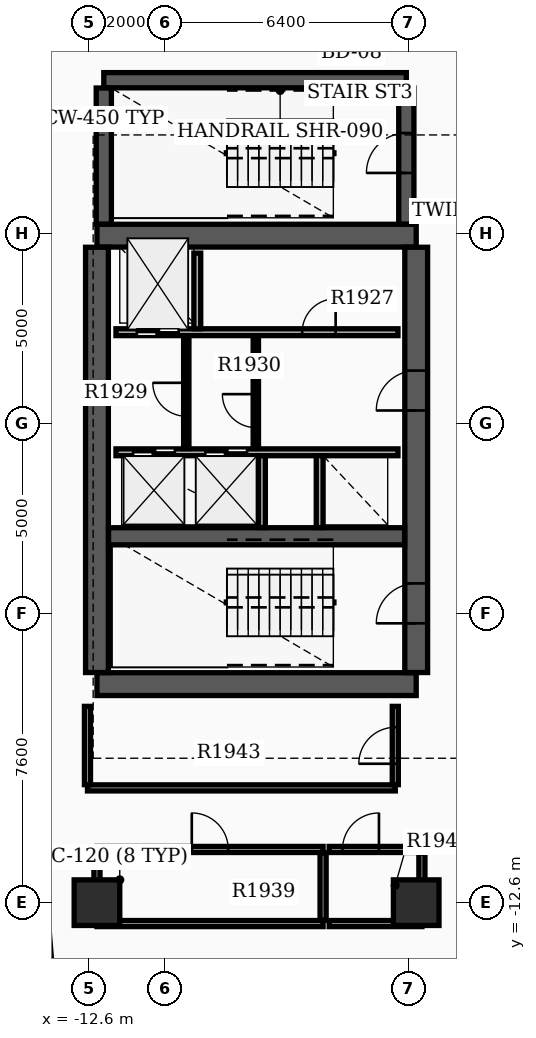
"""IFC4 building model, lengths in metres.
Left out: names, types, materials, properties, quantities, classifications, styles, units other than length and angle.
Written with IfcOpenShell. Run it as: python <this file> out.ifc"""

import sys

from ifc_helpers import new_model, si_unit, direction, frame, frame_2d, origin, origin_2d, place, context, subcontext, project, spatial, rectangle, extrude, element, fill, save


model = new_model("IFC4")
c1 = context("Model", 3, precision=1e-05, world=origin(), true_north=direction((0.0, 1.0)))
c2 = subcontext(c1, "Body", "Model", "MODEL_VIEW")
j1 = project(units=[si_unit("LENGTHUNIT", "METRE"), si_unit("PLANEANGLEUNIT", "RADIAN")], contexts=[c1])
p1 = place(None, origin())
s1 = spatial("IfcSite", under=j1, at=p1, CompositionType="ELEMENT")
p2 = place(p1, origin())
s2 = spatial("IfcBuilding", under=s1, at=p2, CompositionType="ELEMENT")
p3 = place(p2, frame((0.0, 0.0, 124.2)))
s3 = spatial("IfcBuildingStorey", under=s2, at=p3, CompositionType="ELEMENT", Elevation=124.2)
for number, where, z_axis, x_axis in (
    (1, (-12.4, -6.85, 0.0), (0.0, 0.0, 1.0), (1.0, 0.0, 0.0)),
    (2, (-12.4, 4.95, 0.0), (0.0, 0.0, 1.0), (1.0, 0.0, 0.0)),
):
    element("IfcWall", number, at=place(p3, frame(where, z_axis=z_axis, x_axis=x_axis)), inside=s3, PredefinedType="SHEAR", context=c2, shape_type="SweptSolid", body=[
        extrude(rectangle(XDim=8.4, YDim=0.6, at=frame_2d((4.2, 0.0))), origin(), (0.0, 0.0, 1.0), 3.7),
    ])
p4 = place(p3, frame((-12.4, -6.545, 0.0), z_axis=(0.0, 0.0, 1.0), x_axis=(0.0, 1.0, 0.0)))
e3 = element("IfcWall", 3, at=p4, inside=s3, PredefinedType="SHEAR", context=c2, shape_type="SweptSolid", body=[
    extrude(rectangle(XDim=11.19, YDim=0.6, at=frame_2d((5.595, 0.0))), origin(), (0.0, 0.0, 1.0), 3.7),
])
p5 = place(p3, frame((-4.0, -6.545, 0.0), z_axis=(0.0, 0.0, 1.0), x_axis=(0.0, 1.0, 0.0)))
e4 = element("IfcWall", 4, at=p5, inside=s3, PredefinedType="SHEAR", context=c2, shape_type="SweptSolid", body=[
    extrude(rectangle(XDim=11.19, YDim=0.6, at=frame_2d((5.595, 0.0))), origin(), (0.0, 0.0, 1.0), 3.7),
])
p6 = place(p5, frame((1.295, 0.0, 0.0)))
e5 = element("IfcOpeningElement", 5, at=p6, cuts=e4, PredefinedType="OPENING", context=c2, shape_type="SweptSolid", body=[
    extrude(rectangle(XDim=1.05, YDim=2.15, at=frame_2d((0.525, 1.075))), frame((0.0, 0.31, 0.0), z_axis=(0.0, -1.0, 0.0), x_axis=(1.0, 0.0, 0.0)), (0.0, 0.0, 1.0), 0.62),
])
p7 = place(p5, frame((6.895, 0.0, 0.0)))
e6 = element("IfcOpeningElement", 6, at=p7, cuts=e4, PredefinedType="OPENING", context=c2, shape_type="SweptSolid", body=[
    extrude(rectangle(XDim=1.05, YDim=2.15, at=frame_2d((0.525, 1.075))), frame((0.0, 0.31, 0.0), z_axis=(0.0, -1.0, 0.0), x_axis=(1.0, 0.0, 0.0)), (0.0, 0.0, 1.0), 0.62),
])
p8 = place(p3, frame((-12.095, -2.96, 0.0), z_axis=(0.0, 0.0, 1.0), x_axis=(1.0, 0.0, 0.0)))
e7 = element("IfcWall", 7, at=p8, inside=s3, PredefinedType="SHEAR", context=c2, shape_type="SweptSolid", body=[
    extrude(rectangle(XDim=7.79, YDim=0.45, at=frame_2d((3.895, 0.0))), origin(), (0.0, 0.0, 1.0), 3.7),
])
p9 = place(p3, frame((-12.22, 9.04, 0.0), z_axis=(0.0, 0.0, 1.0), x_axis=(1.0, 0.0, 0.0)))
e8 = element("IfcWall", 8, at=p9, inside=s3, PredefinedType="SHEAR", context=c2, shape_type="SweptSolid", body=[
    extrude(rectangle(XDim=7.96, YDim=0.4, at=frame_2d((3.98, 0.0))), origin(), (0.0, 0.0, 1.0), 3.7),
])
p10 = place(p3, frame((-12.22, 5.255, 0.0), z_axis=(0.0, 0.0, 1.0), x_axis=(0.0, 1.0, 0.0)))
e9 = element("IfcWall", 9, at=p10, inside=s3, PredefinedType="SHEAR", context=c2, shape_type="SweptSolid", body=[
    extrude(rectangle(XDim=3.58, YDim=0.4, at=frame_2d((1.79, 0.0))), origin(), (0.0, 0.0, 1.0), 3.7),
])
p11 = place(p3, frame((-4.26, 5.255, 0.0), z_axis=(0.0, 0.0, 1.0), x_axis=(0.0, 1.0, 0.0)))
e10 = element("IfcWall", 10, at=p11, inside=s3, PredefinedType="SHEAR", context=c2, shape_type="SweptSolid", body=[
    extrude(rectangle(XDim=3.58, YDim=0.4, at=frame_2d((1.79, 0.0))), origin(), (0.0, 0.0, 1.0), 3.7),
])
p12 = place(p11, frame((1.345, 0.0, 0.0)))
e11 = element("IfcOpeningElement", 11, at=p12, cuts=e10, PredefinedType="OPENING", context=c2, shape_type="SweptSolid", body=[
    extrude(rectangle(XDim=1.05, YDim=2.15, at=frame_2d((0.525, 1.075))), frame((0.0, 0.21, 0.0), z_axis=(0.0, -1.0, 0.0), x_axis=(1.0, 0.0, 0.0)), (0.0, 0.0, 1.0), 0.42),
])
for number, where, z_axis, x_axis in (
    (12, (-12.4, -12.6, 0.0), (0.0, 0.0, 1.0), (1.0, 0.0, 0.0)),
    (13, (-4.0, -12.6, 0.0), (0.0, 0.0, 1.0), (1.0, 0.0, 0.0)),
):
    element("IfcColumn", number, at=place(p3, frame(where, z_axis=z_axis, x_axis=x_axis)), inside=s3, PredefinedType="COLUMN", context=c2, shape_type="SweptSolid", body=[
        extrude(rectangle(XDim=1.2, YDim=1.2, at=origin_2d()), origin(), (0.0, 0.0, 1.0), 3.9),
    ])
p13 = place(p3, frame((-14.238, -7.721, 0.0), z_axis=(0.0, 0.0, 1.0), x_axis=(0.078438149236, -0.996918982036, 0.0)))
e14 = element("IfcWall", 14, at=p13, inside=s3, PredefinedType="STANDARD", context=c2, shape_type="SweptSolid", body=[
    extrude(rectangle(XDim=6.86, YDim=0.28, at=frame_2d((3.43, 0.0))), origin(), (0.0, 0.0, 1.0), 2.97),
])
p14 = place(p3, frame((-11.9, 2.41, 0.0), z_axis=(0.0, 0.0, 1.0), x_axis=(1.0, 0.0, 0.0)))
e15 = element("IfcWall", 15, at=p14, inside=s3, PredefinedType="SOLIDWALL", context=c2, shape_type="SweptSolid", body=[
    extrude(rectangle(XDim=7.42, YDim=0.18, at=frame_2d((3.71, 0.0))), origin(), (0.0, 0.0, 1.0), 2.96),
])
p15 = place(p14, frame((0.55, 0.0, 0.0)))
e16 = element("IfcOpeningElement", 16, at=p15, cuts=e15, PredefinedType="OPENING", context=c2, shape_type="SweptSolid", body=[
    extrude(rectangle(XDim=1.1, YDim=2.15, at=frame_2d((0.55, 1.075))), frame((0.0, 0.1, 0.0), z_axis=(0.0, -1.0, 0.0), x_axis=(1.0, 0.0, 0.0)), (0.0, 0.0, 1.0), 0.2),
])
p16 = place(p14, frame((4.9, 0.0, 0.0)))
e17 = element("IfcOpeningElement", 17, at=p16, cuts=e15, PredefinedType="OPENING", context=c2, shape_type="SweptSolid", body=[
    extrude(rectangle(XDim=0.88, YDim=2.1, at=frame_2d((0.44, 1.05))), frame((0.0, 0.1, 0.0), z_axis=(0.0, -1.0, 0.0), x_axis=(1.0, 0.0, 0.0)), (0.0, 0.0, 1.0), 0.2),
])
p17 = place(p3, frame((-11.9, -0.75, 0.0), z_axis=(0.0, 0.0, 1.0), x_axis=(1.0, 0.0, 0.0)))
e18 = element("IfcWall", 18, at=p17, inside=s3, PredefinedType="SOLIDWALL", context=c2, shape_type="SweptSolid", body=[
    extrude(rectangle(XDim=7.42, YDim=0.18, at=frame_2d((3.71, 0.0))), origin(), (0.0, 0.0, 1.0), 2.96),
])
p18 = place(p17, frame((0.45, 0.0, 0.0)))
e19 = element("IfcOpeningElement", 19, at=p18, cuts=e18, PredefinedType="OPENING", context=c2, shape_type="SweptSolid", body=[
    extrude(rectangle(XDim=1.1, YDim=2.15, at=frame_2d((0.55, 1.075))), frame((0.0, 0.1, 0.0), z_axis=(0.0, -1.0, 0.0), x_axis=(1.0, 0.0, 0.0)), (0.0, 0.0, 1.0), 0.2),
])
p19 = place(p17, frame((2.35, 0.0, 0.0)))
e20 = element("IfcOpeningElement", 20, at=p19, cuts=e18, PredefinedType="OPENING", context=c2, shape_type="SweptSolid", body=[
    extrude(rectangle(XDim=1.1, YDim=2.15, at=frame_2d((0.55, 1.075))), frame((0.0, 0.1, 0.0), z_axis=(0.0, -1.0, 0.0), x_axis=(1.0, 0.0, 0.0)), (0.0, 0.0, 1.0), 0.2),
])
p20 = place(p3, frame((-9.76, 2.5, 0.0), z_axis=(0.0, 0.0, 1.0), x_axis=(0.0, 1.0, 0.0)))
e21 = element("IfcWall", 21, at=p20, inside=s3, PredefinedType="SOLIDWALL", context=c2, shape_type="SweptSolid", body=[
    extrude(rectangle(XDim=1.99, YDim=0.18, at=frame_2d((0.995, 0.0))), origin(), (0.0, 0.0, 1.0), 2.96),
])
for number, where, z_axis, x_axis in (
    (22, (-8.06, -2.73, 0.0), (0.0, 0.0, 1.0), (0.0, 1.0, 0.0)),
    (23, (-6.54, -2.73, 0.0), (0.0, 0.0, 1.0), (0.0, 1.0, 0.0)),
):
    element("IfcWall", number, at=place(p3, frame(where, z_axis=z_axis, x_axis=x_axis)), inside=s3, PredefinedType="SOLIDWALL", context=c2, shape_type="SweptSolid", body=[
        extrude(rectangle(XDim=1.89, YDim=0.18, at=frame_2d((0.945, 0.0))), origin(), (0.0, 0.0, 1.0), 2.96),
    ])
p21 = place(p3, frame((-8.22, -0.65, 0.0), z_axis=(0.0, 0.0, 1.0), x_axis=(0.0, 1.0, 0.0)))
e24 = element("IfcWall", 24, at=p21, inside=s3, PredefinedType="SOLIDWALL", context=c2, shape_type="SweptSolid", body=[
    extrude(rectangle(XDim=2.96, YDim=0.14, at=frame_2d((1.48, 0.0))), origin(), (0.0, 0.0, 1.0), 2.96),
])
p22 = place(p21, frame((0.55, 0.0, 0.0)))
e25 = element("IfcOpeningElement", 25, at=p22, cuts=e24, PredefinedType="OPENING", context=c2, shape_type="SweptSolid", body=[
    extrude(rectangle(XDim=0.88, YDim=2.1, at=frame_2d((0.44, 1.05))), frame((0.0, 0.08, 0.0), z_axis=(0.0, -1.0, 0.0), x_axis=(1.0, 0.0, 0.0)), (0.0, 0.0, 1.0), 0.16),
])
p23 = place(p3, frame((-10.05, -0.652, 0.0), z_axis=(0.0, 0.0, 1.0), x_axis=(0.0, 1.0, 0.0)))
e26 = element("IfcWall", 26, at=p23, inside=s3, PredefinedType="PARTITIONING", context=c2, shape_type="SweptSolid", body=[
    extrude(rectangle(XDim=2.962, YDim=0.14, at=frame_2d((1.481, 0.0))), origin(), (0.0, 0.0, 1.0), 2.96),
])
p24 = place(p23, frame((0.85, 0.0, 0.0)))
e27 = element("IfcOpeningElement", 27, at=p24, cuts=e26, PredefinedType="OPENING", context=c2, shape_type="SweptSolid", body=[
    extrude(rectangle(XDim=0.88, YDim=2.1, at=frame_2d((0.44, 1.05))), frame((0.0, 0.08, 0.0), z_axis=(0.0, -1.0, 0.0), x_axis=(1.0, 0.0, 0.0)), (0.0, 0.0, 1.0), 0.16),
])
p25 = place(p3, frame((-12.4, -13.15, 0.0), z_axis=(0.0, 0.0, 1.0), x_axis=(1.0, 0.0, 0.0)))
e28 = element("IfcWall", 28, at=p25, inside=s3, PredefinedType="PARTITIONING", context=c2, shape_type="SweptSolid", body=[
    extrude(rectangle(XDim=5.95, YDim=0.16, at=frame_2d((2.975, 0.0))), origin(), (0.0, 0.0, 1.0), 2.96),
])
p26 = place(p3, frame((-12.4, -11.2, 0.0), z_axis=(0.0, 0.0, 1.0), x_axis=(1.0, 0.0, 0.0)))
e29 = element("IfcWall", 29, at=p26, inside=s3, PredefinedType="PARTITIONING", context=c2, shape_type="SweptSolid", body=[
    extrude(rectangle(XDim=5.95, YDim=0.16, at=frame_2d((2.975, 0.0))), origin(), (0.0, 0.0, 1.0), 2.96),
])
p27 = place(p26, frame((2.495, 0.0, 0.0)))
e30 = element("IfcOpeningElement", 30, at=p27, cuts=e29, PredefinedType="OPENING", context=c2, shape_type="SweptSolid", body=[
    extrude(rectangle(XDim=0.96, YDim=2.15, at=frame_2d((0.48, 1.075))), frame((0.0, 0.09, 0.0), z_axis=(0.0, -1.0, 0.0), x_axis=(1.0, 0.0, 0.0)), (0.0, 0.0, 1.0), 0.18),
])
for number, where, z_axis, x_axis in (
    (31, (-12.4, -13.065, 0.0), (0.0, 0.0, 1.0), (0.0, 1.0, 0.0)),
    (32, (-6.45, -13.065, 0.0), (0.0, 0.0, 1.0), (0.0, 1.0, 0.0)),
):
    element("IfcWall", number, at=place(p3, frame(where, z_axis=z_axis, x_axis=x_axis)), inside=s3, PredefinedType="PARTITIONING", context=c2, shape_type="SweptSolid", body=[
        extrude(rectangle(XDim=1.78, YDim=0.16, at=frame_2d((0.89, 0.0))), origin(), (0.0, 0.0, 1.0), 2.96),
    ])
p28 = place(p3, frame((-6.29, -13.15, 0.0), z_axis=(0.0, 0.0, 1.0), x_axis=(1.0, 0.0, 0.0)))
e33 = element("IfcWall", 33, at=p28, inside=s3, PredefinedType="PARTITIONING", context=c2, shape_type="SweptSolid", body=[
    extrude(rectangle(XDim=2.44, YDim=0.16, at=frame_2d((1.22, 0.0))), origin(), (0.0, 0.0, 1.0), 2.96),
])
p29 = place(p3, frame((-6.29, -11.2, 0.0), z_axis=(0.0, 0.0, 1.0), x_axis=(1.0, 0.0, 0.0)))
e34 = element("IfcWall", 34, at=p29, inside=s3, PredefinedType="PARTITIONING", context=c2, shape_type="SweptSolid", body=[
    extrude(rectangle(XDim=2.44, YDim=0.16, at=frame_2d((1.22, 0.0))), origin(), (0.0, 0.0, 1.0), 2.96),
])
p30 = place(p29, frame((0.35, 0.0, 0.0)))
e35 = element("IfcOpeningElement", 35, at=p30, cuts=e34, PredefinedType="OPENING", context=c2, shape_type="SweptSolid", body=[
    extrude(rectangle(XDim=0.96, YDim=2.15, at=frame_2d((0.48, 1.075))), frame((0.0, 0.09, 0.0), z_axis=(0.0, -1.0, 0.0), x_axis=(1.0, 0.0, 0.0)), (0.0, 0.0, 1.0), 0.18),
])
p31 = place(p3, frame((-3.85, -13.065, 0.0), z_axis=(0.0, 0.0, 1.0), x_axis=(0.0, 1.0, 0.0)))
e36 = element("IfcWall", 36, at=p31, inside=s3, PredefinedType="PARTITIONING", context=c2, shape_type="SweptSolid", body=[
    extrude(rectangle(XDim=1.78, YDim=0.16, at=frame_2d((0.89, 0.0))), origin(), (0.0, 0.0, 1.0), 2.96),
])
p32 = place(p3, frame((-12.65, -9.58, 0.0), z_axis=(0.0, 0.0, 1.0), x_axis=(1.0, 0.0, 0.0)))
e37 = element("IfcWall", 37, at=p32, inside=s3, PredefinedType="PARTITIONING", context=c2, shape_type="SweptSolid", body=[
    extrude(rectangle(XDim=8.1, YDim=0.16, at=frame_2d((4.05, 0.0))), origin(), (0.0, 0.0, 1.0), 2.96),
])
p33 = place(p3, frame((-12.65, -9.495, 0.0), z_axis=(0.0, 0.0, 1.0), x_axis=(0.0, 1.0, 0.0)))
e38 = element("IfcWall", 38, at=p33, inside=s3, PredefinedType="PARTITIONING", context=c2, shape_type="SweptSolid", body=[
    extrude(rectangle(XDim=2.06, YDim=0.16, at=frame_2d((1.03, 0.0))), origin(), (0.0, 0.0, 1.0), 2.96),
])
p34 = place(p3, frame((-4.55, -9.495, 0.0), z_axis=(0.0, 0.0, 1.0), x_axis=(0.0, 1.0, 0.0)))
e39 = element("IfcWall", 39, at=p34, inside=s3, PredefinedType="PARTITIONING", context=c2, shape_type="SweptSolid", body=[
    extrude(rectangle(XDim=2.06, YDim=0.16, at=frame_2d((1.03, 0.0))), origin(), (0.0, 0.0, 1.0), 2.96),
])
p35 = place(p34, frame((0.55, 0.0, 0.0)))
e40 = element("IfcOpeningElement", 40, at=p35, cuts=e39, PredefinedType="OPENING", context=c2, shape_type="SweptSolid", body=[
    extrude(rectangle(XDim=0.96, YDim=2.15, at=frame_2d((0.48, 1.075))), frame((0.0, 0.09, 0.0), z_axis=(0.0, -1.0, 0.0), x_axis=(1.0, 0.0, 0.0)), (0.0, 0.0, 1.0), 0.18),
])
p36 = place(p6, origin())
e41 = element("IfcDoor", 41, at=p36, inside=s3, OperationType="SINGLE_SWING_LEFT", PredefinedType="DOOR", context=c2, shape_type="SweptSolid", body=[
    extrude(rectangle(XDim=1.05, YDim=2.15, at=frame_2d((0.525, 1.075))), frame((0.0, 0.025, 0.0), z_axis=(0.0, -1.0, 0.0), x_axis=(1.0, 0.0, 0.0)), (0.0, 0.0, 1.0), 0.05),
])
fill(e5, e41)
p37 = place(p7, origin())
e42 = element("IfcDoor", 42, at=p37, inside=s3, OperationType="SINGLE_SWING_LEFT", PredefinedType="DOOR", context=c2, shape_type="SweptSolid", body=[
    extrude(rectangle(XDim=1.05, YDim=2.15, at=frame_2d((0.525, 1.075))), frame((0.0, 0.025, 0.0), z_axis=(0.0, -1.0, 0.0), x_axis=(1.0, 0.0, 0.0)), (0.0, 0.0, 1.0), 0.05),
])
fill(e6, e42)
p38 = place(p12, origin())
e43 = element("IfcDoor", 43, at=p38, inside=s3, OperationType="SINGLE_SWING_LEFT", PredefinedType="DOOR", context=c2, shape_type="SweptSolid", body=[
    extrude(rectangle(XDim=1.05, YDim=2.15, at=frame_2d((0.525, 1.075))), frame((0.0, 0.025, 0.0), z_axis=(0.0, -1.0, 0.0), x_axis=(1.0, 0.0, 0.0)), (0.0, 0.0, 1.0), 0.05),
])
fill(e11, e43)
p39 = place(p15, origin())
e44 = element("IfcDoor", 44, at=p39, inside=s3, OperationType="DOUBLE_DOOR_SLIDING", PredefinedType="DOOR", context=c2, shape_type="SweptSolid", body=[
    extrude(rectangle(XDim=1.1, YDim=2.15, at=frame_2d((0.55, 1.075))), frame((0.0, 0.025, 0.0), z_axis=(0.0, -1.0, 0.0), x_axis=(1.0, 0.0, 0.0)), (0.0, 0.0, 1.0), 0.05),
])
fill(e16, e44)
p40 = place(p18, origin())
e45 = element("IfcDoor", 45, at=p40, inside=s3, OperationType="DOUBLE_DOOR_SLIDING", PredefinedType="DOOR", context=c2, shape_type="SweptSolid", body=[
    extrude(rectangle(XDim=1.1, YDim=2.15, at=frame_2d((0.55, 1.075))), frame((0.0, 0.025, 0.0), z_axis=(0.0, -1.0, 0.0), x_axis=(1.0, 0.0, 0.0)), (0.0, 0.0, 1.0), 0.05),
])
fill(e19, e45)
p41 = place(p19, origin())
e46 = element("IfcDoor", 46, at=p41, inside=s3, OperationType="DOUBLE_DOOR_SLIDING", PredefinedType="DOOR", context=c2, shape_type="SweptSolid", body=[
    extrude(rectangle(XDim=1.1, YDim=2.15, at=frame_2d((0.55, 1.075))), frame((0.0, 0.025, 0.0), z_axis=(0.0, -1.0, 0.0), x_axis=(1.0, 0.0, 0.0)), (0.0, 0.0, 1.0), 0.05),
])
fill(e20, e46)
p42 = place(p16, origin())
e47 = element("IfcDoor", 47, at=p42, inside=s3, OperationType="SINGLE_SWING_RIGHT", PredefinedType="DOOR", context=c2, shape_type="SweptSolid", body=[
    extrude(rectangle(XDim=0.88, YDim=2.1, at=frame_2d((0.44, 1.05))), frame((0.0, 0.025, 0.0), z_axis=(0.0, -1.0, 0.0), x_axis=(1.0, 0.0, 0.0)), (0.0, 0.0, 1.0), 0.05),
])
fill(e17, e47)
p43 = place(p22, origin())
e48 = element("IfcDoor", 48, at=p43, inside=s3, OperationType="SINGLE_SWING_RIGHT", PredefinedType="DOOR", context=c2, shape_type="SweptSolid", body=[
    extrude(rectangle(XDim=0.88, YDim=2.1, at=frame_2d((0.44, 1.05))), frame((0.0, 0.025, 0.0), z_axis=(0.0, -1.0, 0.0), x_axis=(1.0, 0.0, 0.0)), (0.0, 0.0, 1.0), 0.05),
])
fill(e25, e48)
p44 = place(p24, origin())
e49 = element("IfcDoor", 49, at=p44, inside=s3, OperationType="SINGLE_SWING_RIGHT", PredefinedType="DOOR", context=c2, shape_type="SweptSolid", body=[
    extrude(rectangle(XDim=0.88, YDim=2.1, at=frame_2d((0.44, 1.05))), frame((0.0, 0.025, 0.0), z_axis=(0.0, -1.0, 0.0), x_axis=(1.0, 0.0, 0.0)), (0.0, 0.0, 1.0), 0.05),
])
fill(e27, e49)
p45 = place(p27, origin())
e50 = element("IfcDoor", 50, at=p45, inside=s3, OperationType="SINGLE_SWING_LEFT", PredefinedType="DOOR", context=c2, shape_type="SweptSolid", body=[
    extrude(rectangle(XDim=0.96, YDim=2.15, at=frame_2d((0.48, 1.075))), frame((0.0, 0.025, 0.0), z_axis=(0.0, -1.0, 0.0), x_axis=(1.0, 0.0, 0.0)), (0.0, 0.0, 1.0), 0.05),
])
fill(e30, e50)
p46 = place(p30, origin())
e51 = element("IfcDoor", 51, at=p46, inside=s3, OperationType="SINGLE_SWING_RIGHT", PredefinedType="DOOR", context=c2, shape_type="SweptSolid", body=[
    extrude(rectangle(XDim=0.96, YDim=2.15, at=frame_2d((0.48, 1.075))), frame((0.0, 0.025, 0.0), z_axis=(0.0, -1.0, 0.0), x_axis=(1.0, 0.0, 0.0)), (0.0, 0.0, 1.0), 0.05),
])
fill(e35, e51)
p47 = place(p35, origin())
e52 = element("IfcDoor", 52, at=p47, inside=s3, OperationType="SINGLE_SWING_LEFT", PredefinedType="DOOR", context=c2, shape_type="SweptSolid", body=[
    extrude(rectangle(XDim=0.96, YDim=2.15, at=frame_2d((0.48, 1.075))), frame((0.0, 0.025, 0.0), z_axis=(0.0, -1.0, 0.0), x_axis=(1.0, 0.0, 0.0)), (0.0, 0.0, 1.0), 0.05),
])
fill(e40, e52)
save(model, sys.argv[1])
